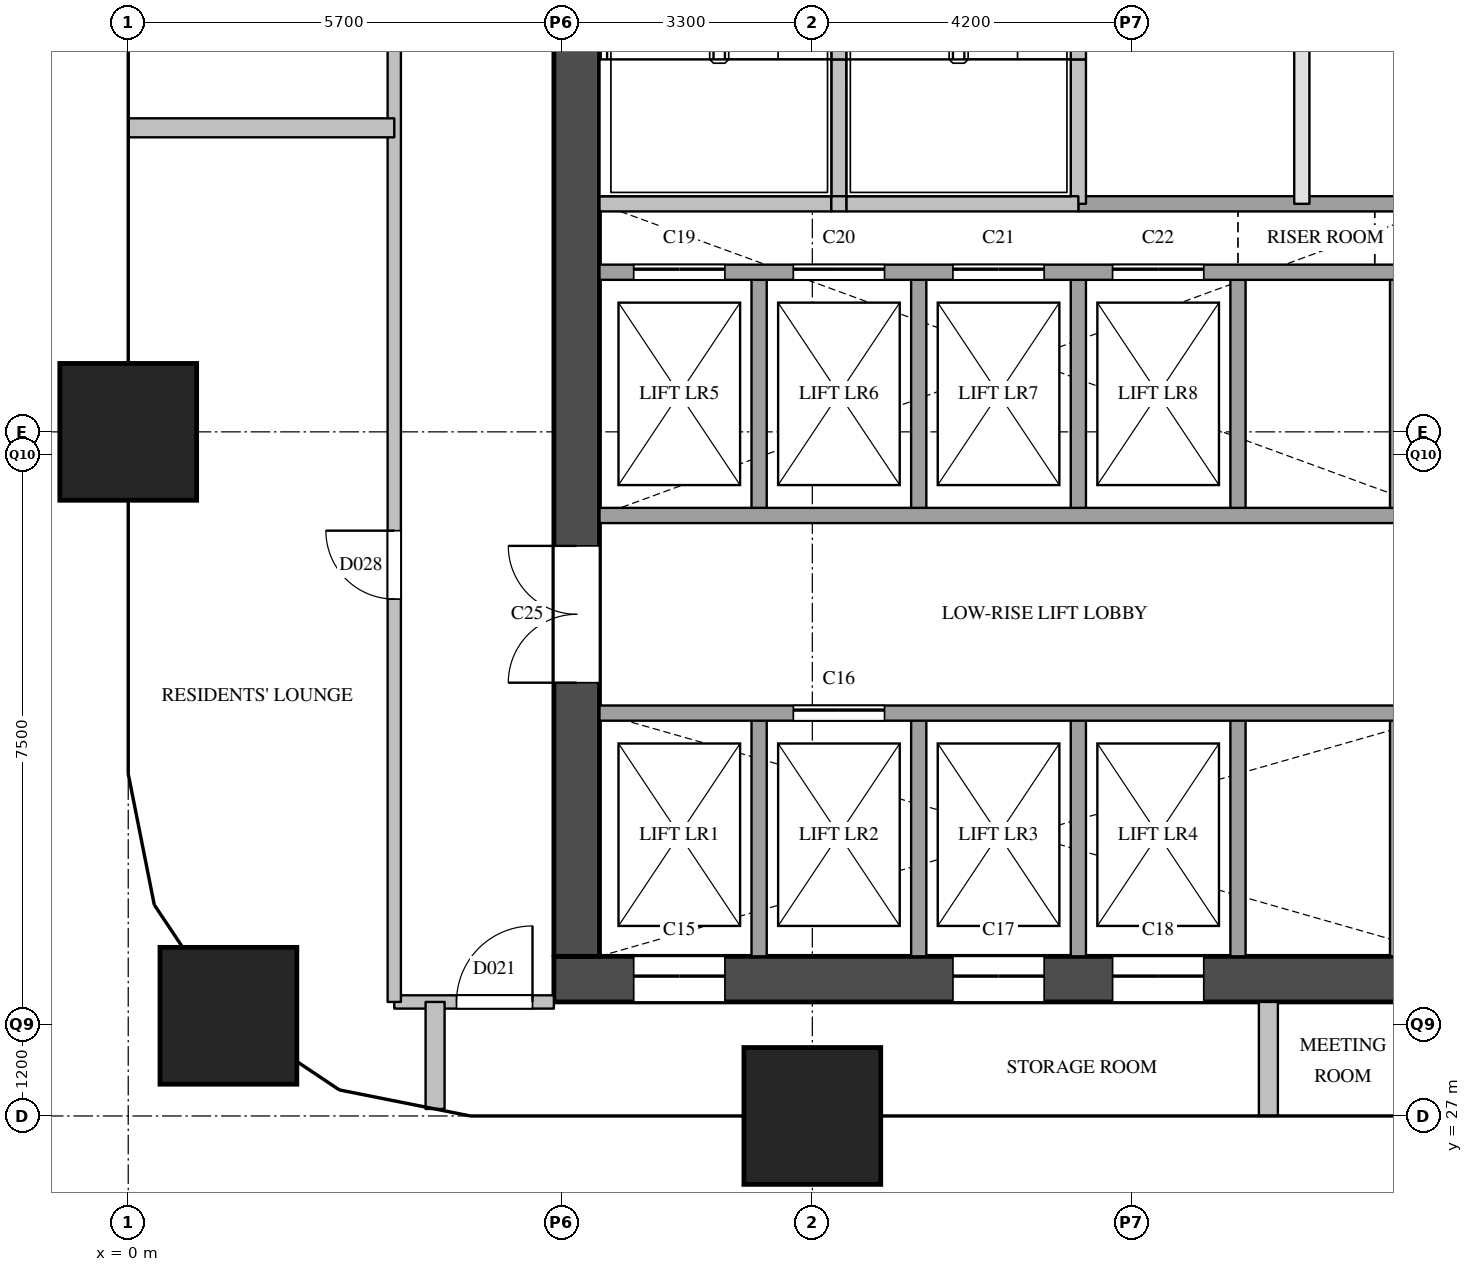
"""IFC4 building model, lengths in metres.
Left out: names, types, materials, properties, quantities, classifications, styles, units other than length and angle.
Written with IfcOpenShell. Run it as: python <this file> out.ifc"""

import sys

from ifc_helpers import new_model, si_unit, direction, frame, frame_2d, origin, origin_2d, place, context, subcontext, project, spatial, rectangle, extrude, element, fill, save


model = new_model("IFC4")
c1 = context("Model", 3, precision=1e-05, world=origin(), true_north=direction((0.0, 1.0)))
c2 = subcontext(c1, "Body", "Model", "MODEL_VIEW")
j1 = project(units=[si_unit("LENGTHUNIT", "METRE"), si_unit("PLANEANGLEUNIT", "RADIAN")], contexts=[c1])
p1 = place(None, origin())
s1 = spatial("IfcSite", under=j1, at=p1, CompositionType="ELEMENT")
p2 = place(p1, origin())
s2 = spatial("IfcBuilding", under=s1, at=p2, CompositionType="ELEMENT")
p3 = place(p2, frame((0.0, 0.0, 85.4)))
s3 = spatial("IfcBuildingStorey", under=s2, at=p3, CompositionType="ELEMENT", Elevation=85.4)
for number, where, z_axis, x_axis in (
    (1, (1.318, 28.318, 0.0), (0.0, 0.0, 1.0), (1.0, 0.0, 0.0)),
    (2, (0.0, 36.0, 0.0), (0.0, 0.0, 1.0), (1.0, 0.0, 0.0)),
    (3, (9.0, 27.0, 0.0), (0.0, 0.0, 1.0), (1.0, 0.0, 0.0)),
):
    element("IfcColumn", number, at=place(p3, frame(where, z_axis=z_axis, x_axis=x_axis)), inside=s3, PredefinedType="COLUMN", context=c2, shape_type="SweptSolid", body=[
        extrude(rectangle(XDim=1.8, YDim=1.8, at=origin_2d()), origin(), (0.0, 0.0, 1.0), 3.8),
    ])
p4 = place(p3, frame((5.6, 28.8, 0.0), z_axis=(0.0, 0.0, 1.0), x_axis=(1.0, 0.0, 0.0)))
e4 = element("IfcWall", 4, at=p4, inside=s3, PredefinedType="SHEAR", context=c2, shape_type="SweptSolid", body=[
    extrude(rectangle(XDim=12.4, YDim=0.6, at=frame_2d((6.2, 0.0))), origin(), (0.0, 0.0, 1.0), 3.5),
])
p5 = place(p4, frame((1.05, 0.0, 0.0)))
e5 = element("IfcOpeningElement", 5, at=p5, cuts=e4, PredefinedType="OPENING", context=c2, shape_type="SweptSolid", body=[
    extrude(rectangle(XDim=1.2, YDim=2.1, at=frame_2d((0.6, 1.05))), frame((0.0, 0.31, 0.0), z_axis=(0.0, -1.0, 0.0), x_axis=(1.0, 0.0, 0.0)), (0.0, 0.0, 1.0), 0.62),
])
p6 = place(p4, frame((5.25, 0.0, 0.0)))
e6 = element("IfcOpeningElement", 6, at=p6, cuts=e4, PredefinedType="OPENING", context=c2, shape_type="SweptSolid", body=[
    extrude(rectangle(XDim=1.2, YDim=2.1, at=frame_2d((0.6, 1.05))), frame((0.0, 0.31, 0.0), z_axis=(0.0, -1.0, 0.0), x_axis=(1.0, 0.0, 0.0)), (0.0, 0.0, 1.0), 0.62),
])
p7 = place(p4, frame((7.35, 0.0, 0.0)))
e7 = element("IfcOpeningElement", 7, at=p7, cuts=e4, PredefinedType="OPENING", context=c2, shape_type="SweptSolid", body=[
    extrude(rectangle(XDim=1.2, YDim=2.1, at=frame_2d((0.6, 1.05))), frame((0.0, 0.31, 0.0), z_axis=(0.0, -1.0, 0.0), x_axis=(1.0, 0.0, 0.0)), (0.0, 0.0, 1.0), 0.62),
])
p8 = place(p3, frame((5.9, 29.1, 0.0), z_axis=(0.0, 0.0, 1.0), x_axis=(0.0, 1.0, 0.0)))
e8 = element("IfcWall", 8, at=p8, inside=s3, PredefinedType="SHEAR", context=c2, shape_type="SweptSolid", body=[
    extrude(rectangle(XDim=20.3, YDim=0.6, at=frame_2d((10.15, 0.0))), origin(), (0.0, 0.0, 1.0), 3.5),
])
p9 = place(p8, frame((3.6, 0.0, 0.0)))
e9 = element("IfcOpeningElement", 9, at=p9, cuts=e8, PredefinedType="OPENING", context=c2, shape_type="SweptSolid", body=[
    extrude(rectangle(XDim=1.8, YDim=2.1, at=frame_2d((0.9, 1.05))), frame((0.0, 0.31, 0.0), z_axis=(0.0, -1.0, 0.0), x_axis=(1.0, 0.0, 0.0)), (0.0, 0.0, 1.0), 0.62),
])
p10 = place(p8, frame((16.4, 0.0, 0.0)))
e10 = element("IfcOpeningElement", 10, at=p10, cuts=e8, PredefinedType="OPENING", context=c2, shape_type="SweptSolid", body=[
    extrude(rectangle(XDim=1.0, YDim=2.1, at=frame_2d((0.5, 1.05))), frame((0.0, 0.31, 0.0), z_axis=(0.0, -1.0, 0.0), x_axis=(1.0, 0.0, 0.0)), (0.0, 0.0, 1.0), 0.62),
])
p11 = place(p3, frame((8.3, 29.1, 0.0), z_axis=(0.0, 0.0, 1.0), x_axis=(0.0, 1.0, 0.0)))
e11 = element("IfcWall", 11, at=p11, inside=s3, PredefinedType="SOLIDWALL", context=c2, shape_type="SweptSolid", body=[
    extrude(rectangle(XDim=3.2, YDim=0.2, at=frame_2d((1.6, 0.0))), origin(), (0.0, 0.0, 1.0), 3.5),
])
p12 = place(p3, frame((8.3, 34.9, 0.0), z_axis=(0.0, 0.0, 1.0), x_axis=(0.0, 1.0, 0.0)))
e12 = element("IfcWall", 12, at=p12, inside=s3, PredefinedType="SOLIDWALL", context=c2, shape_type="SweptSolid", body=[
    extrude(rectangle(XDim=3.2, YDim=0.2, at=frame_2d((1.6, 0.0))), origin(), (0.0, 0.0, 1.0), 3.5),
])
p13 = place(p3, frame((9.35, 39.0, 0.0), z_axis=(0.0, 0.0, 1.0), x_axis=(0.0, 1.0, 0.0)))
e13 = element("IfcWall", 13, at=p13, inside=s3, PredefinedType="SOLIDWALL", context=c2, shape_type="SweptSolid", body=[
    extrude(rectangle(XDim=1.9, YDim=0.2, at=frame_2d((0.95, 0.0))), origin(), (0.0, 0.0, 1.0), 3.5),
])
p14 = place(p3, frame((9.35, 40.9, 0.0), z_axis=(0.0, 0.0, 1.0), x_axis=(0.0, 1.0, 0.0)))
e14 = element("IfcWall", 14, at=p14, inside=s3, PredefinedType="SOLIDWALL", context=c2, shape_type="SweptSolid", body=[
    extrude(rectangle(XDim=4.3, YDim=0.2, at=frame_2d((2.15, 0.0))), origin(), (0.0, 0.0, 1.0), 3.5),
])
p15 = place(p3, frame((10.4, 29.1, 0.0), z_axis=(0.0, 0.0, 1.0), x_axis=(0.0, 1.0, 0.0)))
e15 = element("IfcWall", 15, at=p15, inside=s3, PredefinedType="SOLIDWALL", context=c2, shape_type="SweptSolid", body=[
    extrude(rectangle(XDim=3.2, YDim=0.2, at=frame_2d((1.6, 0.0))), origin(), (0.0, 0.0, 1.0), 3.5),
])
p16 = place(p3, frame((10.4, 34.9, 0.0), z_axis=(0.0, 0.0, 1.0), x_axis=(0.0, 1.0, 0.0)))
e16 = element("IfcWall", 16, at=p16, inside=s3, PredefinedType="SOLIDWALL", context=c2, shape_type="SweptSolid", body=[
    extrude(rectangle(XDim=3.2, YDim=0.2, at=frame_2d((1.6, 0.0))), origin(), (0.0, 0.0, 1.0), 3.5),
])
p17 = place(p3, frame((12.5, 29.1, 0.0), z_axis=(0.0, 0.0, 1.0), x_axis=(0.0, 1.0, 0.0)))
e17 = element("IfcWall", 17, at=p17, inside=s3, PredefinedType="SOLIDWALL", context=c2, shape_type="SweptSolid", body=[
    extrude(rectangle(XDim=3.2, YDim=0.2, at=frame_2d((1.6, 0.0))), origin(), (0.0, 0.0, 1.0), 3.5),
])
p18 = place(p3, frame((12.5, 34.9, 0.0), z_axis=(0.0, 0.0, 1.0), x_axis=(0.0, 1.0, 0.0)))
e18 = element("IfcWall", 18, at=p18, inside=s3, PredefinedType="SOLIDWALL", context=c2, shape_type="SweptSolid", body=[
    extrude(rectangle(XDim=3.2, YDim=0.2, at=frame_2d((1.6, 0.0))), origin(), (0.0, 0.0, 1.0), 3.5),
])
p19 = place(p3, frame((12.5, 39.0, 0.0), z_axis=(0.0, 0.0, 1.0), x_axis=(0.0, 1.0, 0.0)))
e19 = element("IfcWall", 19, at=p19, inside=s3, PredefinedType="SOLIDWALL", context=c2, shape_type="SweptSolid", body=[
    extrude(rectangle(XDim=1.9, YDim=0.2, at=frame_2d((0.95, 0.0))), origin(), (0.0, 0.0, 1.0), 3.5),
])
p20 = place(p3, frame((12.5, 40.9, 0.0), z_axis=(0.0, 0.0, 1.0), x_axis=(0.0, 1.0, 0.0)))
e20 = element("IfcWall", 20, at=p20, inside=s3, PredefinedType="SOLIDWALL", context=c2, shape_type="SweptSolid", body=[
    extrude(rectangle(XDim=4.3, YDim=0.2, at=frame_2d((2.15, 0.0))), origin(), (0.0, 0.0, 1.0), 3.5),
])
p21 = place(p3, frame((14.6, 29.1, 0.0), z_axis=(0.0, 0.0, 1.0), x_axis=(0.0, 1.0, 0.0)))
e21 = element("IfcWall", 21, at=p21, inside=s3, PredefinedType="SOLIDWALL", context=c2, shape_type="SweptSolid", body=[
    extrude(rectangle(XDim=3.2, YDim=0.2, at=frame_2d((1.6, 0.0))), origin(), (0.0, 0.0, 1.0), 3.5),
])
p22 = place(p3, frame((14.6, 34.9, 0.0), z_axis=(0.0, 0.0, 1.0), x_axis=(0.0, 1.0, 0.0)))
e22 = element("IfcWall", 22, at=p22, inside=s3, PredefinedType="SOLIDWALL", context=c2, shape_type="SweptSolid", body=[
    extrude(rectangle(XDim=3.2, YDim=0.2, at=frame_2d((1.6, 0.0))), origin(), (0.0, 0.0, 1.0), 3.5),
])
p23 = place(p3, frame((15.44, 39.0, 0.0), z_axis=(0.0, 0.0, 1.0), x_axis=(0.0, 1.0, 0.0)))
e23 = element("IfcWall", 23, at=p23, inside=s3, PredefinedType="PARTITIONING", context=c2, shape_type="SweptSolid", body=[
    extrude(rectangle(XDim=6.2, YDim=0.2, at=frame_2d((3.1, 0.0))), origin(), (0.0, 0.0, 1.0), 3.5),
])
p24 = place(p3, frame((16.7, 29.1, 0.0), z_axis=(0.0, 0.0, 1.0), x_axis=(0.0, 1.0, 0.0)))
e24 = element("IfcWall", 24, at=p24, inside=s3, PredefinedType="SOLIDWALL", context=c2, shape_type="SweptSolid", body=[
    extrude(rectangle(XDim=3.2, YDim=0.2, at=frame_2d((1.6, 0.0))), origin(), (0.0, 0.0, 1.0), 3.5),
])
p25 = place(p3, frame((16.7, 34.9, 0.0), z_axis=(0.0, 0.0, 1.0), x_axis=(0.0, 1.0, 0.0)))
e25 = element("IfcWall", 25, at=p25, inside=s3, PredefinedType="SOLIDWALL", context=c2, shape_type="SweptSolid", body=[
    extrude(rectangle(XDim=3.2, YDim=0.2, at=frame_2d((1.6, 0.0))), origin(), (0.0, 0.0, 1.0), 3.5),
])
p26 = place(p3, frame((6.2, 32.3, 0.0), z_axis=(0.0, 0.0, 1.0), x_axis=(1.0, 0.0, 0.0)))
e26 = element("IfcWall", 26, at=p26, inside=s3, PredefinedType="SOLIDWALL", context=c2, shape_type="SweptSolid", body=[
    extrude(rectangle(XDim=11.2, YDim=0.2, at=frame_2d((5.6, 0.0))), origin(), (0.0, 0.0, 1.0), 3.5),
])
p27 = place(p26, frame((2.55, 0.0, 0.0)))
e27 = element("IfcOpeningElement", 27, at=p27, cuts=e26, PredefinedType="OPENING", context=c2, shape_type="SweptSolid", body=[
    extrude(rectangle(XDim=1.2, YDim=2.1, at=frame_2d((0.6, 1.05))), frame((0.0, 0.11, 0.0), z_axis=(0.0, -1.0, 0.0), x_axis=(1.0, 0.0, 0.0)), (0.0, 0.0, 1.0), 0.22),
])
p28 = place(p3, frame((6.2, 34.9, 0.0), z_axis=(0.0, 0.0, 1.0), x_axis=(1.0, 0.0, 0.0)))
e28 = element("IfcWall", 28, at=p28, inside=s3, PredefinedType="SOLIDWALL", context=c2, shape_type="SweptSolid", body=[
    extrude(rectangle(XDim=11.2, YDim=0.2, at=frame_2d((5.6, 0.0))), origin(), (0.0, 0.0, 1.0), 3.5),
])
p29 = place(p3, frame((6.2, 38.1, 0.0), z_axis=(0.0, 0.0, 1.0), x_axis=(1.0, 0.0, 0.0)))
e29 = element("IfcWall", 29, at=p29, inside=s3, PredefinedType="SOLIDWALL", context=c2, shape_type="SweptSolid", body=[
    extrude(rectangle(XDim=11.2, YDim=0.2, at=frame_2d((5.6, 0.0))), origin(), (0.0, 0.0, 1.0), 3.5),
])
p30 = place(p29, frame((0.45, 0.0, 0.0)))
e30 = element("IfcOpeningElement", 30, at=p30, cuts=e29, PredefinedType="OPENING", context=c2, shape_type="SweptSolid", body=[
    extrude(rectangle(XDim=1.2, YDim=2.1, at=frame_2d((0.6, 1.05))), frame((0.0, 0.11, 0.0), z_axis=(0.0, -1.0, 0.0), x_axis=(1.0, 0.0, 0.0)), (0.0, 0.0, 1.0), 0.22),
])
p31 = place(p29, frame((2.55, 0.0, 0.0)))
e31 = element("IfcOpeningElement", 31, at=p31, cuts=e29, PredefinedType="OPENING", context=c2, shape_type="SweptSolid", body=[
    extrude(rectangle(XDim=1.2, YDim=2.1, at=frame_2d((0.6, 1.05))), frame((0.0, 0.11, 0.0), z_axis=(0.0, -1.0, 0.0), x_axis=(1.0, 0.0, 0.0)), (0.0, 0.0, 1.0), 0.22),
])
p32 = place(p29, frame((4.65, 0.0, 0.0)))
e32 = element("IfcOpeningElement", 32, at=p32, cuts=e29, PredefinedType="OPENING", context=c2, shape_type="SweptSolid", body=[
    extrude(rectangle(XDim=1.2, YDim=2.1, at=frame_2d((0.6, 1.05))), frame((0.0, 0.11, 0.0), z_axis=(0.0, -1.0, 0.0), x_axis=(1.0, 0.0, 0.0)), (0.0, 0.0, 1.0), 0.22),
])
p33 = place(p29, frame((6.75, 0.0, 0.0)))
e33 = element("IfcOpeningElement", 33, at=p33, cuts=e29, PredefinedType="OPENING", context=c2, shape_type="SweptSolid", body=[
    extrude(rectangle(XDim=1.2, YDim=2.1, at=frame_2d((0.6, 1.05))), frame((0.0, 0.11, 0.0), z_axis=(0.0, -1.0, 0.0), x_axis=(1.0, 0.0, 0.0)), (0.0, 0.0, 1.0), 0.22),
])
p34 = place(p3, frame((12.5, 39.0, 0.0), z_axis=(0.0, 0.0, 1.0), x_axis=(1.0, 0.0, 0.0)))
e34 = element("IfcWall", 34, at=p34, inside=s3, PredefinedType="SOLIDWALL", context=c2, shape_type="SweptSolid", body=[
    extrude(rectangle(XDim=4.9, YDim=0.2, at=frame_2d((2.45, 0.0))), origin(), (0.0, 0.0, 1.0), 3.5),
])
p35 = place(p3, frame((6.2, 39.0, 0.0), z_axis=(0.0, 0.0, 1.0), x_axis=(1.0, 0.0, 0.0)))
e35 = element("IfcWall", 35, at=p35, inside=s3, PredefinedType="SOLIDWALL", context=c2, shape_type="SweptSolid", body=[
    extrude(rectangle(XDim=3.05, YDim=0.2, at=frame_2d((1.525, 0.0))), origin(), (0.0, 0.0, 1.0), 3.5),
])
p36 = place(p3, frame((9.25, 39.0, 0.0), z_axis=(0.0, 0.0, 1.0), x_axis=(1.0, 0.0, 0.0)))
e36 = element("IfcWall", 36, at=p36, inside=s3, PredefinedType="SOLIDWALL", context=c2, shape_type="SweptSolid", body=[
    extrude(rectangle(XDim=0.2, YDim=0.2, at=frame_2d((0.1, 0.0))), origin(), (0.0, 0.0, 1.0), 3.5),
])
p37 = place(p3, frame((9.45, 39.0, 0.0), z_axis=(0.0, 0.0, 1.0), x_axis=(1.0, 0.0, 0.0)))
e37 = element("IfcWall", 37, at=p37, inside=s3, PredefinedType="SOLIDWALL", context=c2, shape_type="SweptSolid", body=[
    extrude(rectangle(XDim=3.05, YDim=0.2, at=frame_2d((1.525, 0.0))), origin(), (0.0, 0.0, 1.0), 3.5),
])
p38 = place(p3, frame((3.5, 28.5, 0.0), z_axis=(0.0, 0.0, 1.0), x_axis=(1.0, 0.0, 0.0)))
e38 = element("IfcWall", 38, at=p38, inside=s3, PredefinedType="PARTITIONING", context=c2, shape_type="SweptSolid", body=[
    extrude(rectangle(XDim=2.1, YDim=0.175, at=frame_2d((1.05, 0.0))), origin(), (0.0, 0.0, 1.0), 3.5),
])
p39 = place(p38, frame((0.819, 0.0, 0.0)))
e39 = element("IfcOpeningElement", 39, at=p39, cuts=e38, PredefinedType="OPENING", context=c2, shape_type="SweptSolid", body=[
    extrude(rectangle(XDim=1.0, YDim=2.1, at=frame_2d((0.5, 1.05))), frame((0.0, 0.097, 0.0), z_axis=(0.0, -1.0, 0.0), x_axis=(1.0, 0.0, 0.0)), (0.0, 0.0, 1.0), 0.195),
])
p40 = place(p3, frame((3.5, 28.5, 0.0), z_axis=(0.0, 0.0, 1.0), x_axis=(0.0, 1.0, 0.0)))
e40 = element("IfcWall", 40, at=p40, inside=s3, PredefinedType="PARTITIONING", context=c2, shape_type="SweptSolid", body=[
    extrude(rectangle(XDim=23.6, YDim=0.175, at=frame_2d((11.8, 0.0))), origin(), (0.0, 0.0, 1.0), 3.5),
])
p41 = place(p40, frame((5.3, 0.0, 0.0)))
e41 = element("IfcOpeningElement", 41, at=p41, cuts=e40, PredefinedType="OPENING", context=c2, shape_type="SweptSolid", body=[
    extrude(rectangle(XDim=0.9, YDim=2.1, at=frame_2d((0.45, 1.05))), frame((0.0, 0.097, 0.0), z_axis=(0.0, -1.0, 0.0), x_axis=(1.0, 0.0, 0.0)), (0.0, 0.0, 1.0), 0.195),
])
p42 = place(p40, frame((13.5, 0.0, 0.0)))
e42 = element("IfcOpeningElement", 42, at=p42, cuts=e40, PredefinedType="OPENING", context=c2, shape_type="SweptSolid", body=[
    extrude(rectangle(XDim=1.0, YDim=2.1, at=frame_2d((0.5, 1.05))), frame((0.0, 0.097, 0.0), z_axis=(0.0, -1.0, 0.0), x_axis=(1.0, 0.0, 0.0)), (0.0, 0.0, 1.0), 0.195),
])
p43 = place(p40, frame((19.6, 0.0, 0.0)))
e43 = element("IfcOpeningElement", 43, at=p43, cuts=e40, PredefinedType="OPENING", context=c2, shape_type="SweptSolid", body=[
    extrude(rectangle(XDim=0.9, YDim=2.1, at=frame_2d((0.45, 1.05))), frame((0.0, 0.097, 0.0), z_axis=(0.0, -1.0, 0.0), x_axis=(1.0, 0.0, 0.0)), (0.0, 0.0, 1.0), 0.195),
])
p44 = place(p3, frame((0.0, 40.0, 0.0), z_axis=(0.0, 0.0, 1.0), x_axis=(1.0, 0.0, 0.0)))
e44 = element("IfcWall", 44, at=p44, inside=s3, PredefinedType="PARTITIONING", context=c2, shape_type="SweptSolid", body=[
    extrude(rectangle(XDim=3.5, YDim=0.25, at=frame_2d((1.75, 0.0))), origin(), (0.0, 0.0, 1.0), 2.5),
])
p45 = place(p3, frame((4.037, 27.092, 0.0), z_axis=(0.0, 0.0, 1.0), x_axis=(0.0, 1.0, 0.0)))
e45 = element("IfcWall", 45, at=p45, inside=s3, PredefinedType="PARTITIONING", context=c2, shape_type="SweptSolid", body=[
    extrude(rectangle(XDim=1.408, YDim=0.25, at=frame_2d((0.704, 0.0))), origin(), (0.0, 0.0, 1.0), 2.5),
])
p46 = place(p3, frame((15.0, 27.0, 0.0), z_axis=(0.0, 0.0, 1.0), x_axis=(0.0, 1.0, 0.0)))
e46 = element("IfcWall", 46, at=p46, inside=s3, PredefinedType="PARTITIONING", context=c2, shape_type="SweptSolid", body=[
    extrude(rectangle(XDim=1.5, YDim=0.25, at=frame_2d((0.75, 0.0))), origin(), (0.0, 0.0, 1.0), 2.5),
])
p47 = place(p5, origin())
e47 = element("IfcDoor", 47, at=p47, inside=s3, OperationType="SLIDING_TO_LEFT", PredefinedType="DOOR", context=c2, shape_type="SweptSolid", body=[
    extrude(rectangle(XDim=1.2, YDim=2.1, at=frame_2d((0.6, 1.05))), frame((0.0, 0.025, 0.0), z_axis=(0.0, -1.0, 0.0), x_axis=(1.0, 0.0, 0.0)), (0.0, 0.0, 1.0), 0.05),
])
fill(e5, e47)
p48 = place(p27, origin())
e48 = element("IfcDoor", 48, at=p48, inside=s3, OperationType="SLIDING_TO_LEFT", PredefinedType="DOOR", context=c2, shape_type="SweptSolid", body=[
    extrude(rectangle(XDim=1.2, YDim=2.1, at=frame_2d((0.6, 1.05))), frame((0.0, 0.025, 0.0), z_axis=(0.0, -1.0, 0.0), x_axis=(1.0, 0.0, 0.0)), (0.0, 0.0, 1.0), 0.05),
])
fill(e27, e48)
p49 = place(p6, origin())
e49 = element("IfcDoor", 49, at=p49, inside=s3, OperationType="SLIDING_TO_LEFT", PredefinedType="DOOR", context=c2, shape_type="SweptSolid", body=[
    extrude(rectangle(XDim=1.2, YDim=2.1, at=frame_2d((0.6, 1.05))), frame((0.0, 0.025, 0.0), z_axis=(0.0, -1.0, 0.0), x_axis=(1.0, 0.0, 0.0)), (0.0, 0.0, 1.0), 0.05),
])
fill(e6, e49)
p50 = place(p7, origin())
e50 = element("IfcDoor", 50, at=p50, inside=s3, OperationType="SLIDING_TO_LEFT", PredefinedType="DOOR", context=c2, shape_type="SweptSolid", body=[
    extrude(rectangle(XDim=1.2, YDim=2.1, at=frame_2d((0.6, 1.05))), frame((0.0, 0.025, 0.0), z_axis=(0.0, -1.0, 0.0), x_axis=(1.0, 0.0, 0.0)), (0.0, 0.0, 1.0), 0.05),
])
fill(e7, e50)
p51 = place(p30, origin())
e51 = element("IfcDoor", 51, at=p51, inside=s3, OperationType="SLIDING_TO_LEFT", PredefinedType="DOOR", context=c2, shape_type="SweptSolid", body=[
    extrude(rectangle(XDim=1.2, YDim=2.1, at=frame_2d((0.6, 1.05))), frame((0.0, 0.025, 0.0), z_axis=(0.0, -1.0, 0.0), x_axis=(1.0, 0.0, 0.0)), (0.0, 0.0, 1.0), 0.05),
])
fill(e30, e51)
p52 = place(p31, origin())
e52 = element("IfcDoor", 52, at=p52, inside=s3, OperationType="SLIDING_TO_LEFT", PredefinedType="DOOR", context=c2, shape_type="SweptSolid", body=[
    extrude(rectangle(XDim=1.2, YDim=2.1, at=frame_2d((0.6, 1.05))), frame((0.0, 0.025, 0.0), z_axis=(0.0, -1.0, 0.0), x_axis=(1.0, 0.0, 0.0)), (0.0, 0.0, 1.0), 0.05),
])
fill(e31, e52)
p53 = place(p32, origin())
e53 = element("IfcDoor", 53, at=p53, inside=s3, OperationType="SLIDING_TO_LEFT", PredefinedType="DOOR", context=c2, shape_type="SweptSolid", body=[
    extrude(rectangle(XDim=1.2, YDim=2.1, at=frame_2d((0.6, 1.05))), frame((0.0, 0.025, 0.0), z_axis=(0.0, -1.0, 0.0), x_axis=(1.0, 0.0, 0.0)), (0.0, 0.0, 1.0), 0.05),
])
fill(e32, e53)
p54 = place(p33, origin())
e54 = element("IfcDoor", 54, at=p54, inside=s3, OperationType="SLIDING_TO_LEFT", PredefinedType="DOOR", context=c2, shape_type="SweptSolid", body=[
    extrude(rectangle(XDim=1.2, YDim=2.1, at=frame_2d((0.6, 1.05))), frame((0.0, 0.025, 0.0), z_axis=(0.0, -1.0, 0.0), x_axis=(1.0, 0.0, 0.0)), (0.0, 0.0, 1.0), 0.05),
])
fill(e33, e54)
p55 = place(p9, origin())
e55 = element("IfcDoor", 55, at=p55, inside=s3, OperationType="DOUBLE_DOOR_SINGLE_SWING", PredefinedType="DOOR", context=c2, shape_type="SweptSolid", body=[
    extrude(rectangle(XDim=1.8, YDim=2.1, at=frame_2d((0.9, 1.05))), frame((0.0, 0.025, 0.0), z_axis=(0.0, -1.0, 0.0), x_axis=(1.0, 0.0, 0.0)), (0.0, 0.0, 1.0), 0.05),
])
fill(e9, e55)
p56 = place(p39, origin())
e56 = element("IfcDoor", 56, at=p56, inside=s3, OperationType="SINGLE_SWING_RIGHT", PredefinedType="DOOR", context=c2, shape_type="SweptSolid", body=[
    extrude(rectangle(XDim=1.0, YDim=2.1, at=frame_2d((0.5, 1.05))), frame((0.0, 0.025, 0.0), z_axis=(0.0, -1.0, 0.0), x_axis=(1.0, 0.0, 0.0)), (0.0, 0.0, 1.0), 0.05),
])
fill(e39, e56)
p57 = place(p41, origin())
e57 = element("IfcDoor", 57, at=p57, inside=s3, OperationType="SINGLE_SWING_RIGHT", PredefinedType="DOOR", context=c2, shape_type="SweptSolid", body=[
    extrude(rectangle(XDim=0.9, YDim=2.1, at=frame_2d((0.45, 1.05))), frame((0.0, 0.025, 0.0), z_axis=(0.0, -1.0, 0.0), x_axis=(1.0, 0.0, 0.0)), (0.0, 0.0, 1.0), 0.05),
])
fill(e41, e57)
save(model, sys.argv[1])
